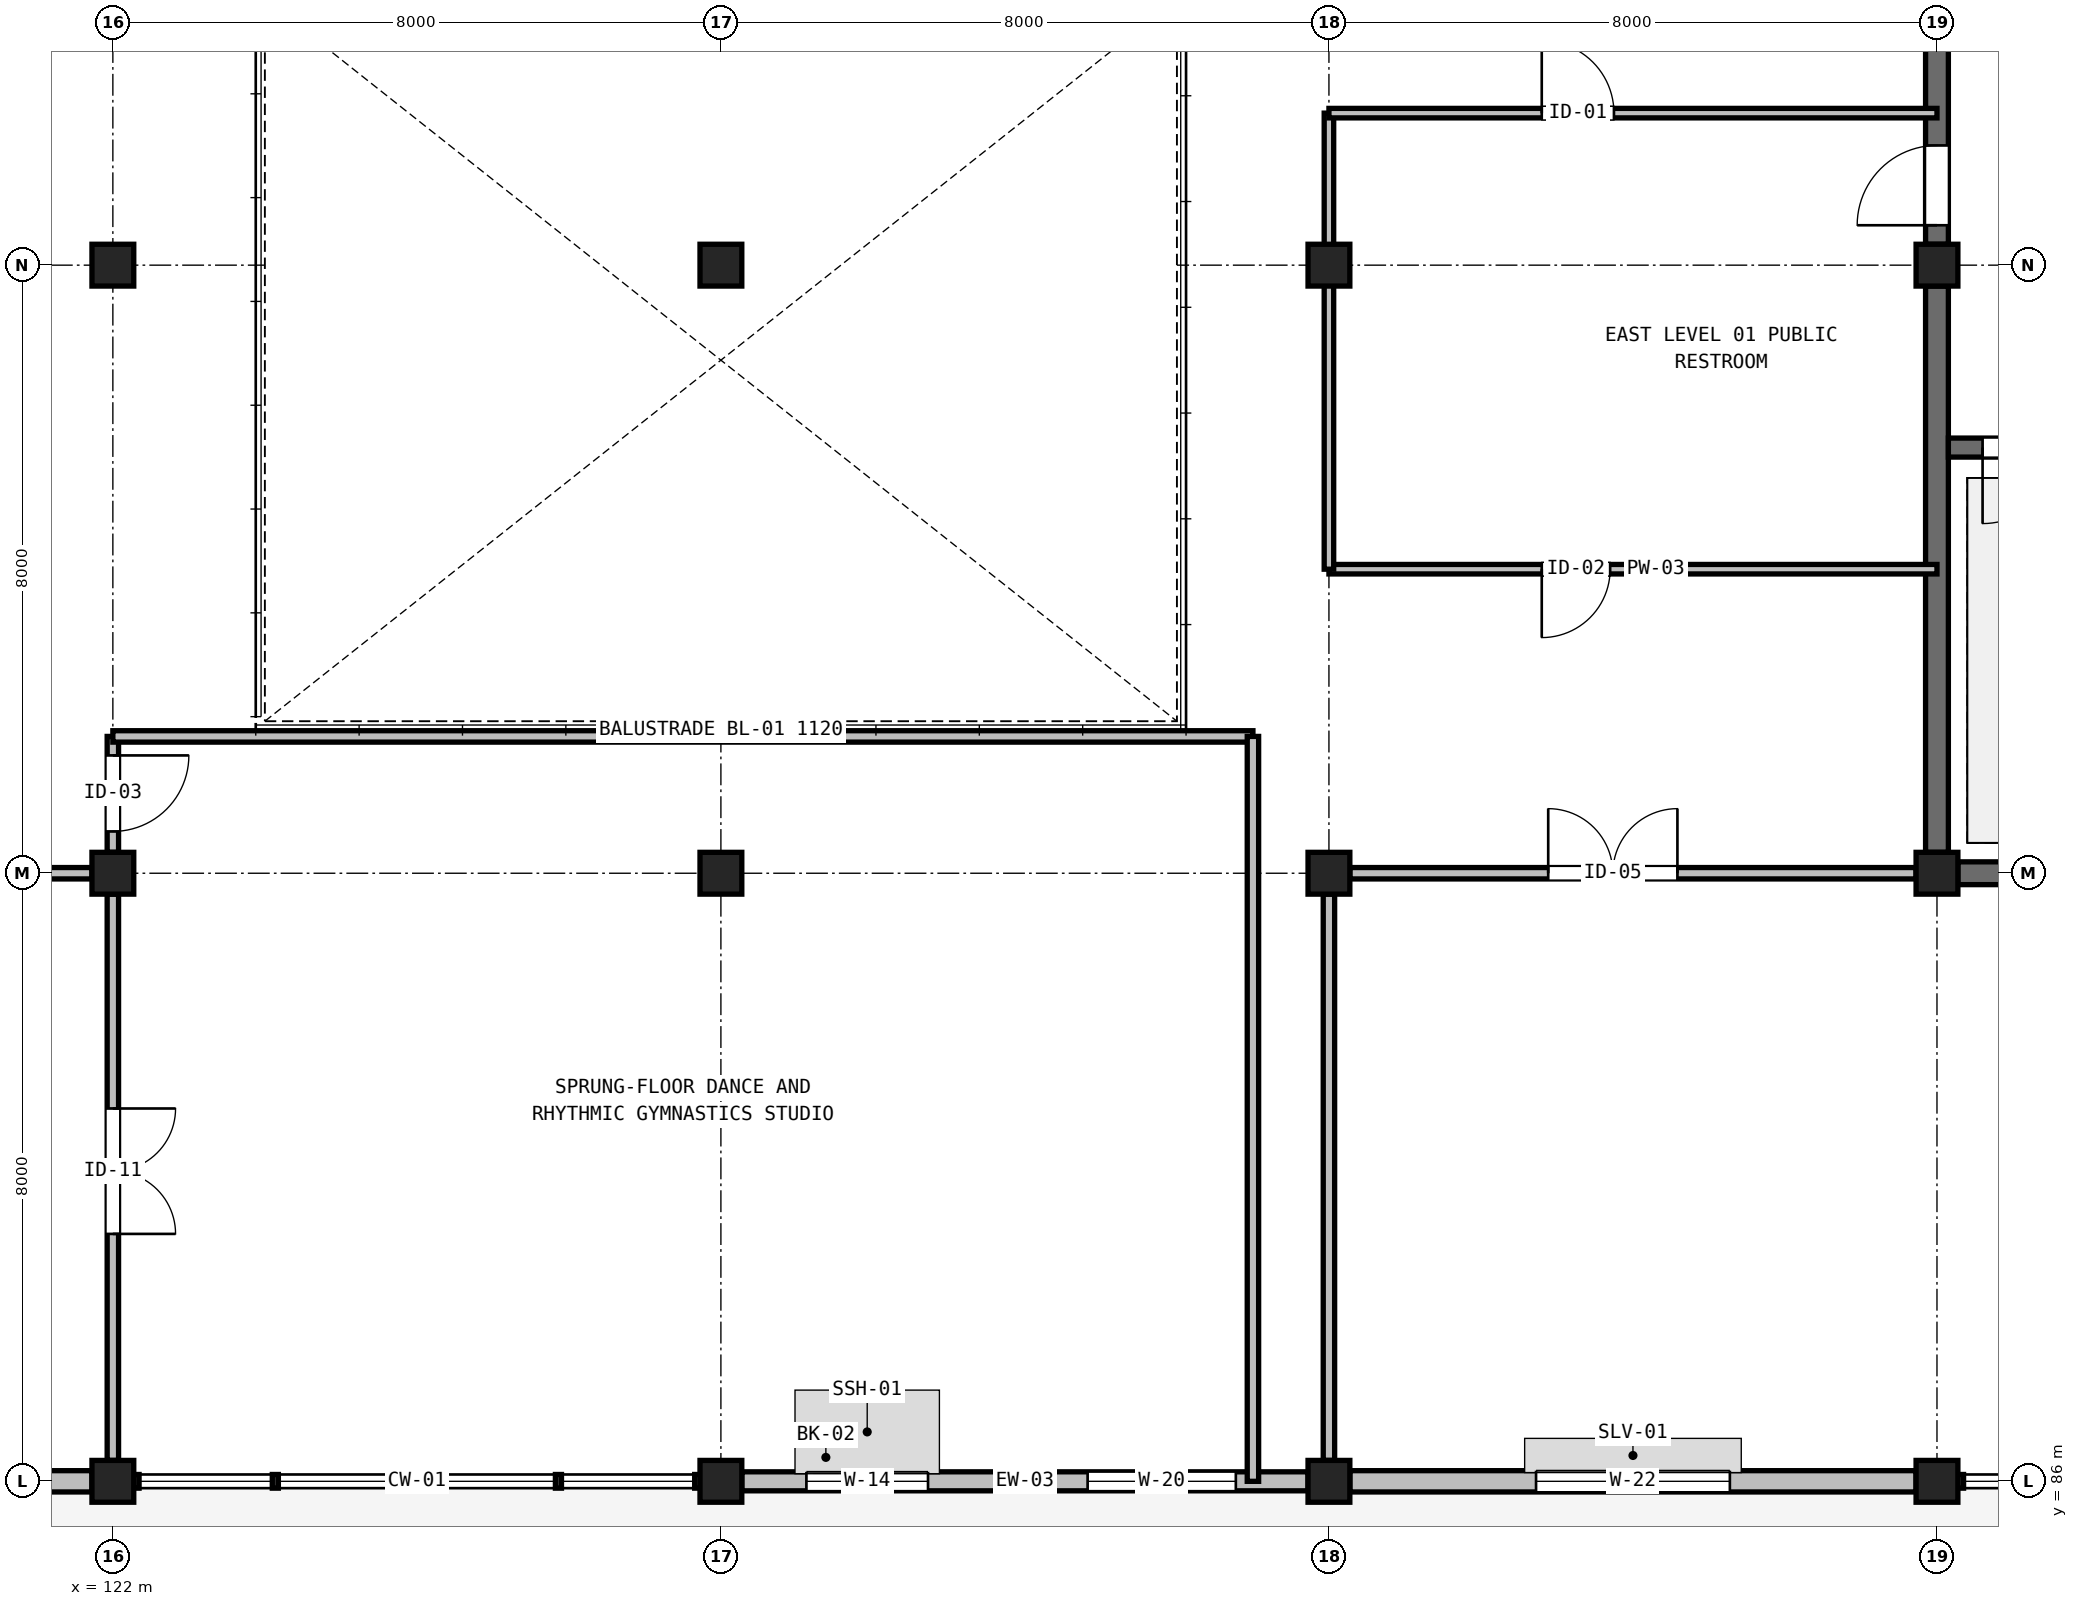
"""IFC4 building model, lengths in metres.
Left out: names, types, materials, properties, quantities, classifications, styles, units other than length and angle.
Written with IfcOpenShell. Run it as: python <this file> out.ifc"""

import sys

from ifc_helpers import new_model, si_unit, direction, frame, frame_2d, origin, origin_2d, place, context, subcontext, project, spatial, rectangle, circle, extrude, element, fill, save


model = new_model("IFC4")
c1 = context("Model", 3, precision=1e-05, world=origin(), true_north=direction((0.0, 1.0)))
c2 = subcontext(c1, "Body", "Model", "MODEL_VIEW")
j1 = project(units=[si_unit("LENGTHUNIT", "METRE"), si_unit("PLANEANGLEUNIT", "RADIAN")], contexts=[c1])
p1 = place(None, origin())
s1 = spatial("IfcSite", under=j1, at=p1, CompositionType="ELEMENT")
p2 = place(p1, origin())
s2 = spatial("IfcBuilding", under=s1, at=p2, CompositionType="ELEMENT")
p3 = place(p2, frame((0.0, 0.0, 5.4)))
s3 = spatial("IfcBuildingStorey", under=s2, at=p3, CompositionType="ELEMENT", Elevation=5.4)
for number, where, z_axis, x_axis in (
    (1, (122.0, 86.0, 0.0), (0.0, 0.0, 1.0), (1.0, 0.0, 0.0)),
    (2, (122.0, 94.0, 0.0), (0.0, 0.0, 1.0), (1.0, 0.0, 0.0)),
    (3, (122.0, 102.0, 0.0), (0.0, 0.0, 1.0), (1.0, 0.0, 0.0)),
    (4, (130.0, 86.0, 0.0), (0.0, 0.0, 1.0), (1.0, 0.0, 0.0)),
    (5, (130.0, 94.0, 0.0), (0.0, 0.0, 1.0), (1.0, 0.0, 0.0)),
    (6, (130.0, 102.0, 0.0), (0.0, 0.0, 1.0), (1.0, 0.0, 0.0)),
    (7, (138.0, 86.0, 0.0), (0.0, 0.0, 1.0), (1.0, 0.0, 0.0)),
    (8, (138.0, 94.0, 0.0), (0.0, 0.0, 1.0), (1.0, 0.0, 0.0)),
    (9, (138.0, 102.0, 0.0), (0.0, 0.0, 1.0), (1.0, 0.0, 0.0)),
    (10, (146.0, 86.0, 0.0), (0.0, 0.0, 1.0), (1.0, 0.0, 0.0)),
    (11, (146.0, 94.0, 0.0), (0.0, 0.0, 1.0), (1.0, 0.0, 0.0)),
    (12, (146.0, 102.0, 0.0), (0.0, 0.0, 1.0), (1.0, 0.0, 0.0)),
):
    element("IfcColumn", number, at=place(p3, frame(where, z_axis=z_axis, x_axis=x_axis)), inside=s3, PredefinedType="COLUMN", context=c2, shape_type="SweptSolid", body=[
        extrude(circle(Radius=0.275, at=origin_2d()), origin(), (0.0, 0.0, 1.0), 5.4),
    ])
p4 = place(p3, frame((114.275, 86.0, 0.0), z_axis=(0.0, 0.0, 1.0), x_axis=(1.0, 0.0, 0.0)))
e13 = element("IfcWall", 13, at=p4, inside=s3, PredefinedType="SOLIDWALL", context=c2, shape_type="SweptSolid", body=[
    extrude(rectangle(XDim=7.45, YDim=0.28, at=frame_2d((3.725, 0.0))), origin(), (0.0, 0.0, 1.0), 4.39),
])
p5 = place(p4, frame((1.32, 0.0, 2.35)))
e14 = element("IfcOpeningElement", 14, at=p5, cuts=e13, PredefinedType="OPENING", context=c2, shape_type="SweptSolid", body=[
    extrude(rectangle(XDim=4.8, YDim=1.4, at=frame_2d((2.4, 0.7))), frame((0.0, 0.15, 0.0), z_axis=(0.0, -1.0, 0.0), x_axis=(1.0, 0.0, 0.0)), (0.0, 0.0, 1.0), 0.3),
])
p6 = place(p3, frame((130.275, 86.0, 0.0), z_axis=(0.0, 0.0, 1.0), x_axis=(1.0, 0.0, 0.0)))
e15 = element("IfcWall", 15, at=p6, inside=s3, PredefinedType="SOLIDWALL", context=c2, shape_type="SweptSolid", body=[
    extrude(rectangle(XDim=7.45, YDim=0.25, at=frame_2d((3.725, 0.0))), origin(), (0.0, 0.0, 1.0), 4.59),
])
p7 = place(p6, frame((0.85, 0.0, 0.9)))
e16 = element("IfcOpeningElement", 16, at=p7, cuts=e15, PredefinedType="OPENING", context=c2, shape_type="SweptSolid", body=[
    extrude(rectangle(XDim=1.6, YDim=2.0, at=frame_2d((0.8, 1.0))), frame((0.0, 0.135, 0.0), z_axis=(0.0, -1.0, 0.0), x_axis=(1.0, 0.0, 0.0)), (0.0, 0.0, 1.0), 0.27),
])
p8 = place(p6, frame((4.55, 0.0, 0.95)))
e17 = element("IfcOpeningElement", 17, at=p8, cuts=e15, PredefinedType="OPENING", context=c2, shape_type="SweptSolid", body=[
    extrude(rectangle(XDim=1.95, YDim=1.85, at=frame_2d((0.975, 0.925))), frame((0.0, 0.135, 0.0), z_axis=(0.0, -1.0, 0.0), x_axis=(1.0, 0.0, 0.0)), (0.0, 0.0, 1.0), 0.27),
])
p9 = place(p3, frame((138.275, 86.0, 0.0), z_axis=(0.0, 0.0, 1.0), x_axis=(1.0, 0.0, 0.0)))
e18 = element("IfcWall", 18, at=p9, inside=s3, PredefinedType="SOLIDWALL", context=c2, shape_type="SweptSolid", body=[
    extrude(rectangle(XDim=7.45, YDim=0.28, at=frame_2d((3.725, 0.0))), origin(), (0.0, 0.0, 1.0), 4.49),
])
p10 = place(p9, frame((2.45, 0.0, 0.95)))
e19 = element("IfcOpeningElement", 19, at=p10, cuts=e18, PredefinedType="OPENING", context=c2, shape_type="SweptSolid", body=[
    extrude(rectangle(XDim=2.55, YDim=1.85, at=frame_2d((1.275, 0.925))), frame((0.0, 0.15, 0.0), z_axis=(0.0, -1.0, 0.0), x_axis=(1.0, 0.0, 0.0)), (0.0, 0.0, 1.0), 0.3),
])
for number, where, z_axis, x_axis in (
    (20, (146.275, 94.0, 0.0), (0.0, 0.0, 1.0), (1.0, 0.0, 0.0)),
    (21, (146.0, 94.275, 0.0), (0.0, 0.0, 1.0), (0.0, 1.0, 0.0)),
):
    element("IfcWall", number, at=place(p3, frame(where, z_axis=z_axis, x_axis=x_axis)), inside=s3, PredefinedType="SHEAR", context=c2, shape_type="SweptSolid", body=[
        extrude(rectangle(XDim=7.45, YDim=0.3, at=frame_2d((3.725, 0.0))), origin(), (0.0, 0.0, 1.0), 5.18),
    ])
p11 = place(p3, frame((146.0, 102.275, 0.0), z_axis=(0.0, 0.0, 1.0), x_axis=(0.0, 1.0, 0.0)))
e22 = element("IfcWall", 22, at=p11, inside=s3, PredefinedType="SHEAR", context=c2, shape_type="SweptSolid", body=[
    extrude(rectangle(XDim=3.725, YDim=0.3, at=frame_2d((1.863, 0.0))), origin(), (0.0, 0.0, 1.0), 5.18),
])
p12 = place(p11, frame((0.25, 0.0, 0.0)))
e23 = element("IfcOpeningElement", 23, at=p12, cuts=e22, PredefinedType="OPENING", context=c2, shape_type="SweptSolid", body=[
    extrude(rectangle(XDim=1.05, YDim=2.2, at=frame_2d((0.525, 1.1))), frame((0.0, 0.16, 0.0), z_axis=(0.0, -1.0, 0.0), x_axis=(1.0, 0.0, 0.0)), (0.0, 0.0, 1.0), 0.32),
])
p13 = place(p3, frame((146.15, 99.6, 0.0), z_axis=(0.0, 0.0, 1.0), x_axis=(1.0, 0.0, 0.0)))
e24 = element("IfcWall", 24, at=p13, inside=s3, PredefinedType="SOLIDWALL", context=c2, shape_type="SweptSolid", body=[
    extrude(rectangle(XDim=7.7, YDim=0.25, at=frame_2d((3.85, 0.0))), origin(), (0.0, 0.0, 1.0), 5.18),
])
p14 = place(p13, frame((0.45, 0.0, 0.0)))
e25 = element("IfcOpeningElement", 25, at=p14, cuts=e24, PredefinedType="OPENING", context=c2, shape_type="SweptSolid", body=[
    extrude(rectangle(XDim=1.0, YDim=2.2, at=frame_2d((0.5, 1.1))), frame((0.0, 0.135, 0.0), z_axis=(0.0, -1.0, 0.0), x_axis=(1.0, 0.0, 0.0)), (0.0, 0.0, 1.0), 0.27),
])
p15 = place(p3, frame((114.275, 94.0, 0.0), z_axis=(0.0, 0.0, 1.0), x_axis=(1.0, 0.0, 0.0)))
e26 = element("IfcWall", 26, at=p15, inside=s3, PredefinedType="PARTITIONING", context=c2, shape_type="SweptSolid", body=[
    extrude(rectangle(XDim=7.45, YDim=0.15, at=frame_2d((3.725, 0.0))), origin(), (0.0, 0.0, 1.0), 4.49),
])
p16 = place(p15, frame((2.61, 0.0, 0.0)))
e27 = element("IfcOpeningElement", 27, at=p16, cuts=e26, PredefinedType="OPENING", context=c2, shape_type="SweptSolid", body=[
    extrude(rectangle(XDim=1.7, YDim=2.25, at=frame_2d((0.85, 1.125))), frame((0.0, 0.085, 0.0), z_axis=(0.0, -1.0, 0.0), x_axis=(1.0, 0.0, 0.0)), (0.0, 0.0, 1.0), 0.17),
])
p17 = place(p3, frame((122.0, 86.275, 0.0), z_axis=(0.0, 0.0, 1.0), x_axis=(0.0, 1.0, 0.0)))
e28 = element("IfcWall", 28, at=p17, inside=s3, PredefinedType="PARTITIONING", context=c2, shape_type="SweptSolid", body=[
    extrude(rectangle(XDim=7.45, YDim=0.15, at=frame_2d((3.725, 0.0))), origin(), (0.0, 0.0, 1.0), 4.24),
])
p18 = place(p17, frame((2.98, 0.0, 0.0)))
e29 = element("IfcOpeningElement", 29, at=p18, cuts=e28, PredefinedType="OPENING", context=c2, shape_type="SweptSolid", body=[
    extrude(rectangle(XDim=1.65, YDim=2.25, at=frame_2d((0.825, 1.125))), frame((0.0, 0.085, 0.0), z_axis=(0.0, -1.0, 0.0), x_axis=(1.0, 0.0, 0.0)), (0.0, 0.0, 1.0), 0.17),
])
p19 = place(p3, frame((122.0, 94.275, 0.0), z_axis=(0.0, 0.0, 1.0), x_axis=(0.0, 1.0, 0.0)))
e30 = element("IfcWall", 30, at=p19, inside=s3, PredefinedType="PARTITIONING", context=c2, shape_type="SweptSolid", body=[
    extrude(rectangle(XDim=1.525, YDim=0.15, at=frame_2d((0.763, 0.0))), origin(), (0.0, 0.0, 1.0), 4.24),
])
p20 = place(p19, frame((0.275, 0.0, 0.0)))
e31 = element("IfcOpeningElement", 31, at=p20, cuts=e30, PredefinedType="OPENING", context=c2, shape_type="SweptSolid", body=[
    extrude(rectangle(XDim=1.0, YDim=2.15, at=frame_2d((0.5, 1.075))), frame((0.0, 0.085, 0.0), z_axis=(0.0, -1.0, 0.0), x_axis=(1.0, 0.0, 0.0)), (0.0, 0.0, 1.0), 0.17),
])
p21 = place(p3, frame((122.0, 95.8, 0.0), z_axis=(0.0, 0.0, 1.0), x_axis=(1.0, 0.0, 0.0)))
e32 = element("IfcWall", 32, at=p21, inside=s3, PredefinedType="PARTITIONING", context=c2, shape_type="SweptSolid", body=[
    extrude(rectangle(XDim=15.0, YDim=0.15, at=frame_2d((7.5, 0.0))), origin(), (0.0, 0.0, 1.0), 5.1),
])
p22 = place(p3, frame((137.0, 86.0, 0.0), z_axis=(0.0, 0.0, 1.0), x_axis=(0.0, 1.0, 0.0)))
e33 = element("IfcWall", 33, at=p22, inside=s3, PredefinedType="PARTITIONING", context=c2, shape_type="SweptSolid", body=[
    extrude(rectangle(XDim=9.8, YDim=0.15, at=frame_2d((4.9, 0.0))), origin(), (0.0, 0.0, 1.0), 5.1),
])
p23 = place(p3, frame((138.275, 94.0, 0.0), z_axis=(0.0, 0.0, 1.0), x_axis=(1.0, 0.0, 0.0)))
e34 = element("IfcWall", 34, at=p23, inside=s3, PredefinedType="PARTITIONING", context=c2, shape_type="SweptSolid", body=[
    extrude(rectangle(XDim=7.45, YDim=0.15, at=frame_2d((3.725, 0.0))), origin(), (0.0, 0.0, 1.0), 4.34),
])
p24 = place(p23, frame((2.61, 0.0, 0.0)))
e35 = element("IfcOpeningElement", 35, at=p24, cuts=e34, PredefinedType="OPENING", context=c2, shape_type="SweptSolid", body=[
    extrude(rectangle(XDim=1.7, YDim=2.25, at=frame_2d((0.85, 1.125))), frame((0.0, 0.085, 0.0), z_axis=(0.0, -1.0, 0.0), x_axis=(1.0, 0.0, 0.0)), (0.0, 0.0, 1.0), 0.17),
])
p25 = place(p3, frame((138.0, 86.275, 0.0), z_axis=(0.0, 0.0, 1.0), x_axis=(0.0, 1.0, 0.0)))
e36 = element("IfcWall", 36, at=p25, inside=s3, PredefinedType="PARTITIONING", context=c2, shape_type="SweptSolid", body=[
    extrude(rectangle(XDim=7.45, YDim=0.15, at=frame_2d((3.725, 0.0))), origin(), (0.0, 0.0, 1.0), 4.39),
])
p26 = place(p3, frame((138.0, 98.0, 0.0), z_axis=(0.0, 0.0, 1.0), x_axis=(1.0, 0.0, 0.0)))
e37 = element("IfcWall", 37, at=p26, inside=s3, PredefinedType="PARTITIONING", context=c2, shape_type="SweptSolid", body=[
    extrude(rectangle(XDim=8.0, YDim=0.125, at=frame_2d((4.0, 0.0))), origin(), (0.0, 0.0, 1.0), 5.1),
])
p27 = place(p26, frame((2.8, 0.0, 0.0)))
e38 = element("IfcOpeningElement", 38, at=p27, cuts=e37, PredefinedType="OPENING", context=c2, shape_type="SweptSolid", body=[
    extrude(rectangle(XDim=0.9, YDim=2.1, at=frame_2d((0.45, 1.05))), frame((0.0, 0.073, 0.0), z_axis=(0.0, -1.0, 0.0), x_axis=(1.0, 0.0, 0.0)), (0.0, 0.0, 1.0), 0.145),
])
p28 = place(p3, frame((138.0, 98.0, 0.0), z_axis=(0.0, 0.0, 1.0), x_axis=(0.0, 1.0, 0.0)))
e39 = element("IfcWall", 39, at=p28, inside=s3, PredefinedType="PARTITIONING", context=c2, shape_type="SweptSolid", body=[
    extrude(rectangle(XDim=6.0, YDim=0.125, at=frame_2d((3.0, 0.0))), origin(), (0.0, 0.0, 1.0), 4.34),
])
p29 = place(p3, frame((138.0, 104.0, 0.0), z_axis=(0.0, 0.0, 1.0), x_axis=(1.0, 0.0, 0.0)))
e40 = element("IfcWall", 40, at=p29, inside=s3, PredefinedType="PARTITIONING", context=c2, shape_type="SweptSolid", body=[
    extrude(rectangle(XDim=8.0, YDim=0.125, at=frame_2d((4.0, 0.0))), origin(), (0.0, 0.0, 1.0), 5.1),
])
p30 = place(p29, frame((2.8, 0.0, 0.0)))
e41 = element("IfcOpeningElement", 41, at=p30, cuts=e40, PredefinedType="OPENING", context=c2, shape_type="SweptSolid", body=[
    extrude(rectangle(XDim=0.95, YDim=2.1, at=frame_2d((0.475, 1.05))), frame((0.0, 0.073, 0.0), z_axis=(0.0, -1.0, 0.0), x_axis=(1.0, 0.0, 0.0)), (0.0, 0.0, 1.0), 0.145),
])
p31 = place(p7, origin())
e42 = element("IfcWindow", 42, at=p31, inside=s3, PartitioningType="SINGLE_PANEL", PredefinedType="WINDOW", context=c2, shape_type="SweptSolid", body=[
    extrude(rectangle(XDim=1.6, YDim=2.0, at=frame_2d((0.8, 1.0))), frame((0.0, 0.03, 0.0), z_axis=(0.0, -1.0, 0.0), x_axis=(1.0, 0.0, 0.0)), (0.0, 0.0, 1.0), 0.06),
])
fill(e16, e42)
p32 = place(p8, origin())
e43 = element("IfcWindow", 43, at=p32, inside=s3, PartitioningType="SINGLE_PANEL", PredefinedType="WINDOW", context=c2, shape_type="SweptSolid", body=[
    extrude(rectangle(XDim=1.95, YDim=1.85, at=frame_2d((0.975, 0.925))), frame((0.0, 0.03, 0.0), z_axis=(0.0, -1.0, 0.0), x_axis=(1.0, 0.0, 0.0)), (0.0, 0.0, 1.0), 0.06),
])
fill(e17, e43)
p33 = place(p10, origin())
e44 = element("IfcWindow", 44, at=p33, inside=s3, PartitioningType="SINGLE_PANEL", PredefinedType="WINDOW", context=c2, shape_type="SweptSolid", body=[
    extrude(rectangle(XDim=2.55, YDim=1.85, at=frame_2d((1.275, 0.925))), frame((0.0, 0.03, 0.0), z_axis=(0.0, -1.0, 0.0), x_axis=(1.0, 0.0, 0.0)), (0.0, 0.0, 1.0), 0.06),
])
fill(e19, e44)
p34 = place(p12, origin())
e45 = element("IfcDoor", 45, at=p34, inside=s3, OperationType="SINGLE_SWING_LEFT", PredefinedType="DOOR", context=c2, shape_type="SweptSolid", body=[
    extrude(rectangle(XDim=1.05, YDim=2.2, at=frame_2d((0.525, 1.1))), frame((0.0, 0.025, 0.0), z_axis=(0.0, -1.0, 0.0), x_axis=(1.0, 0.0, 0.0)), (0.0, 0.0, 1.0), 0.05),
])
fill(e23, e45)
p35 = place(p14, frame((1.0, 0.0, 0.0), z_axis=(0.0, 0.0, 1.0), x_axis=(-1.0, 0.0, 0.0)))
e46 = element("IfcDoor", 46, at=p35, inside=s3, OperationType="SINGLE_SWING_LEFT", PredefinedType="DOOR", context=c2, shape_type="SweptSolid", body=[
    extrude(rectangle(XDim=1.0, YDim=2.2, at=frame_2d((0.5, 1.1))), frame((0.0, 0.025, 0.0), z_axis=(0.0, -1.0, 0.0), x_axis=(1.0, 0.0, 0.0)), (0.0, 0.0, 1.0), 0.05),
])
fill(e25, e46)
p36 = place(p18, frame((1.65, 0.0, 0.0), z_axis=(0.0, 0.0, 1.0), x_axis=(-1.0, 0.0, 0.0)))
e47 = element("IfcDoor", 47, at=p36, inside=s3, OperationType="DOUBLE_DOOR_SINGLE_SWING", PredefinedType="DOOR", context=c2, shape_type="SweptSolid", body=[
    extrude(rectangle(XDim=1.65, YDim=2.25, at=frame_2d((0.825, 1.125))), frame((0.0, 0.025, 0.0), z_axis=(0.0, -1.0, 0.0), x_axis=(1.0, 0.0, 0.0)), (0.0, 0.0, 1.0), 0.05),
])
fill(e29, e47)
p37 = place(p20, frame((1.0, 0.0, 0.0), z_axis=(0.0, 0.0, 1.0), x_axis=(-1.0, 0.0, 0.0)))
e48 = element("IfcDoor", 48, at=p37, inside=s3, OperationType="SINGLE_SWING_RIGHT", PredefinedType="DOOR", context=c2, shape_type="SweptSolid", body=[
    extrude(rectangle(XDim=1.0, YDim=2.15, at=frame_2d((0.5, 1.075))), frame((0.0, 0.025, 0.0), z_axis=(0.0, -1.0, 0.0), x_axis=(1.0, 0.0, 0.0)), (0.0, 0.0, 1.0), 0.05),
])
fill(e31, e48)
p38 = place(p24, origin())
e49 = element("IfcDoor", 49, at=p38, inside=s3, OperationType="DOUBLE_DOOR_SINGLE_SWING", PredefinedType="DOOR", context=c2, shape_type="SweptSolid", body=[
    extrude(rectangle(XDim=1.7, YDim=2.25, at=frame_2d((0.85, 1.125))), frame((0.0, 0.025, 0.0), z_axis=(0.0, -1.0, 0.0), x_axis=(1.0, 0.0, 0.0)), (0.0, 0.0, 1.0), 0.05),
])
fill(e35, e49)
p39 = place(p27, frame((0.9, 0.0, 0.0), z_axis=(0.0, 0.0, 1.0), x_axis=(-1.0, 0.0, 0.0)))
e50 = element("IfcDoor", 50, at=p39, inside=s3, OperationType="SINGLE_SWING_LEFT", PredefinedType="DOOR", context=c2, shape_type="SweptSolid", body=[
    extrude(rectangle(XDim=0.9, YDim=2.1, at=frame_2d((0.45, 1.05))), frame((0.0, 0.025, 0.0), z_axis=(0.0, -1.0, 0.0), x_axis=(1.0, 0.0, 0.0)), (0.0, 0.0, 1.0), 0.05),
])
fill(e38, e50)
p40 = place(p30, origin())
e51 = element("IfcDoor", 51, at=p40, inside=s3, OperationType="SINGLE_SWING_LEFT", PredefinedType="DOOR", context=c2, shape_type="SweptSolid", body=[
    extrude(rectangle(XDim=0.95, YDim=2.1, at=frame_2d((0.475, 1.05))), frame((0.0, 0.025, 0.0), z_axis=(0.0, -1.0, 0.0), x_axis=(1.0, 0.0, 0.0)), (0.0, 0.0, 1.0), 0.05),
])
fill(e41, e51)
save(model, sys.argv[1])
